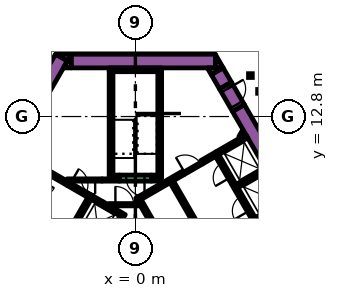
"""IFC4 building model, lengths in metres.
Left out: names, types, materials, properties, quantities, classifications, styles, units other than length and angle.
Written with IfcOpenShell. Run it as: python <this file> out.ifc"""

import sys

from ifc_helpers import new_model, si_unit, direction, frame, frame_2d, origin, origin_2d, place, context, subcontext, project, spatial, polyline, rectangle, outline, extrude, element, fill, save


model = new_model("IFC4")
c1 = context("Model", 3, precision=1e-05, world=origin(), true_north=direction((0.0, 1.0)))
c2 = subcontext(c1, "Body", "Model", "MODEL_VIEW")
j1 = project(units=[si_unit("LENGTHUNIT", "METRE"), si_unit("PLANEANGLEUNIT", "RADIAN")], contexts=[c1])
p1 = place(None, origin())
s1 = spatial("IfcSite", under=j1, at=p1, CompositionType="ELEMENT")
p2 = place(p1, origin())
s2 = spatial("IfcBuilding", under=s1, at=p2, CompositionType="ELEMENT")
p3 = place(p2, origin())
s3 = spatial("IfcBuildingStorey", under=s2, at=p3, CompositionType="ELEMENT", Elevation=0.0)
p4 = place(p3, frame((6.776, 13.364, -1.8), z_axis=(0.0, 0.0, 1.0), x_axis=(0.500004177138, -0.8660229921, 0.0)))
e1 = element("IfcWall", 1, at=p4, inside=s3, PredefinedType="SOLIDWALL", context=c2, shape_type="SweptSolid", body=[
    extrude(rectangle(XDim=20.204, YDim=0.9, at=frame_2d((10.102, 0.0))), origin(), (0.0, 0.0, 1.0), 7.8),
])
p5 = place(p3, frame((-15.36, -1.503, -1.8), z_axis=(0.0, 0.0, 1.0), x_axis=(0.50000389221, 0.866023156604, 0.0)))
e2 = element("IfcWall", 2, at=p5, inside=s3, PredefinedType="SOLIDWALL", context=c2, shape_type="SweptSolid", body=[
    extrude(rectangle(XDim=21.0, YDim=0.9, at=frame_2d((10.5, 0.0))), origin(), (0.0, 0.0, 1.0), 7.8),
])
p6 = place(p3, frame((0.0, 0.0, -1.8)))
e3 = element("IfcWall", 3, at=p6, inside=s3, PredefinedType="SOLIDWALL", context=c2, shape_type="SweptSolid", body=[
    extrude(outline(polyline([(-4.215, 16.9), (-4.469, 16.46), (-5.231, 16.9), (-4.215, 16.9)])), origin(), (0.0, 0.0, 1.0), 7.8),
])
p7 = place(p3, frame((-4.224, 16.45, -1.8), z_axis=(0.0, 0.0, 1.0), x_axis=(1.0, 0.0, 0.0)))
e4 = element("IfcWall", 4, at=p7, inside=s3, PredefinedType="SOLIDWALL", context=c2, shape_type="SweptSolid", body=[
    extrude(rectangle(XDim=9.488, YDim=0.9, at=frame_2d((4.744, 0.0))), origin(), (0.0, 0.0, 1.0), 7.8),
])
e5 = element("IfcWall", 5, at=p6, inside=s3, PredefinedType="SOLIDWALL", context=c2, shape_type="SweptSolid", body=[
    extrude(outline(polyline([(5.265, 16.0), (5.265, 16.88), (5.773, 16.0), (5.265, 16.0)])), origin(), (0.0, 0.0, 1.0), 7.8),
])
e6 = element("IfcWall", 6, at=p6, inside=s3, PredefinedType="SOLIDWALL", context=c2, shape_type="SweptSolid", body=[
    extrude(outline(polyline([(-4.734, 16.0), (-4.226, 16.88), (-4.226, 16.0), (-4.734, 16.0)])), origin(), (0.0, 0.0, 1.0), 7.8),
])
p8 = place(p3, frame((5.926, 14.836, -1.8), z_axis=(0.0, 0.0, 1.0), x_axis=(-0.500076735116, 0.865981096212, 0.0)))
e7 = element("IfcWall", 7, at=p8, inside=s3, PredefinedType="SOLIDWALL", context=c2, shape_type="SweptSolid", body=[
    extrude(rectangle(XDim=1.094, YDim=0.9, at=frame_2d((0.547, 0.0))), origin(), (0.0, 0.0, 1.0), 7.8),
])
e8 = element("IfcWall", 8, at=p6, inside=s3, PredefinedType="SOLIDWALL", context=c2, shape_type="SweptSolid", body=[
    extrude(outline(polyline([(4.734, 16.0), (5.75, 16.0), (4.988, 15.56), (4.734, 16.0)])), origin(), (0.0, 0.0, 1.0), 7.8),
])
p9 = place(p3, frame((-1.725, 15.875, 0.0), z_axis=(0.0, 0.0, 1.0), x_axis=(1.0, 0.0, 0.0)))
e9 = element("IfcWall", 9, at=p9, inside=s3, PredefinedType="SOLIDWALL", context=c2, shape_type="SweptSolid", body=[
    extrude(rectangle(XDim=3.45, YDim=0.25, at=frame_2d((1.725, 0.0))), origin(), (0.0, 0.0, 1.0), 6.0),
])
p10 = place(p3, frame((1.6, 8.95, 0.0), z_axis=(0.0, 0.0, 1.0), x_axis=(0.0, 1.0, 0.0)))
e10 = element("IfcWall", 10, at=p10, inside=s3, PredefinedType="SOLIDWALL", context=c2, shape_type="SweptSolid", body=[
    extrude(rectangle(XDim=6.8, YDim=0.25, at=frame_2d((3.4, 0.0))), origin(), (0.0, 0.0, 1.0), 6.0),
])
p11 = place(p3, frame((1.05, 8.825, 0.0), z_axis=(0.0, 0.0, 1.0), x_axis=(1.0, 0.0, 0.0)))
e11 = element("IfcWall", 11, at=p11, inside=s3, PredefinedType="SOLIDWALL", context=c2, shape_type="SweptSolid", body=[
    extrude(rectangle(XDim=0.675, YDim=0.25, at=frame_2d((0.337, 0.0))), origin(), (0.0, 0.0, 1.0), 6.0),
])
p12 = place(p3, frame((-1.6, 8.7, 0.0), z_axis=(0.0, 0.0, 1.0), x_axis=(0.0, 1.0, 0.0)))
e12 = element("IfcWall", 12, at=p12, inside=s3, PredefinedType="SOLIDWALL", context=c2, shape_type="SweptSolid", body=[
    extrude(rectangle(XDim=7.05, YDim=0.25, at=frame_2d((3.525, 0.0))), origin(), (0.0, 0.0, 1.0), 6.0),
])
p13 = place(p3, frame((-1.475, 8.825, 0.0), z_axis=(0.0, 0.0, 1.0), x_axis=(1.0, 0.0, 0.0)))
e13 = element("IfcWall", 13, at=p13, inside=s3, PredefinedType="SOLIDWALL", context=c2, shape_type="SweptSolid", body=[
    extrude(rectangle(XDim=0.425, YDim=0.25, at=frame_2d((0.212, 0.0))), origin(), (0.0, 0.0, 1.0), 6.0),
])
e14 = element("IfcWall", 14, at=p6, inside=s3, PredefinedType="SOLIDWALL", context=c2, shape_type="SweptSolid", body=[
    extrude(outline(polyline([(0.335, 6.925), (0.335, 7.075), (0.335, 7.075), (0.335, 7.075), (0.245, 7.075), (0.079, 7.363), (0.035, 7.439), (0.252, 7.564), (0.377, 7.348), (6.552, -3.348), (6.677, -3.564), (6.46, -3.689), (4.897, -0.981), (0.332, 6.925), (0.335, 6.925), (0.335, 6.925), (0.335, 6.925)])), origin(), (0.0, 0.0, 1.0), 7.8),
])
p14 = place(p3, frame((4.358, 9.791, -1.8), z_axis=(0.0, 0.0, 1.0), x_axis=(0.866079547155, 0.499906209203, 0.0)))
e15 = element("IfcWall", 15, at=p14, inside=s3, PredefinedType="SOLIDWALL", context=c2, shape_type="SweptSolid", body=[
    extrude(rectangle(XDim=1.15, YDim=0.25, at=frame_2d((0.575, 0.0))), origin(), (0.0, 0.0, 1.0), 7.8),
])
p15 = place(p3, frame((5.356, 10.367, -1.8), z_axis=(0.0, 0.0, 1.0), x_axis=(0.865978535641, 0.50008116922, 0.0)))
e16 = element("IfcWall", 16, at=p15, inside=s3, PredefinedType="SOLIDWALL", context=c2, shape_type="SweptSolid", body=[
    extrude(rectangle(XDim=2.278, YDim=0.25, at=frame_2d((1.139, 0.0))), origin(), (0.0, 0.0, 1.0), 7.8),
])
p16 = place(p3, frame((0.314, 7.456, -1.8), z_axis=(0.0, 0.0, 1.0), x_axis=(0.866013897511, 0.50001992892, 0.0)))
e17 = element("IfcWall", 17, at=p16, inside=s3, PredefinedType="SOLIDWALL", context=c2, shape_type="SweptSolid", body=[
    extrude(rectangle(XDim=3.268, YDim=0.25, at=frame_2d((1.634, 0.0))), origin(), (0.0, 0.0, 1.0), 7.8),
])
for number, where, z_axis, x_axis in (
    (18, (6.684, 8.224, -1.8), (0.0, 0.0, 1.0), (0.866, 0.5, 0.0)),
    (19, (7.944, 6.041, -1.8), (0.0, 0.0, 1.0), (0.866, 0.5, 0.0)),
):
    element("IfcWall", number, at=place(p3, frame(where, z_axis=z_axis, x_axis=x_axis)), inside=s3, PredefinedType="SOLIDWALL", context=c2, shape_type="SweptSolid", body=[
        extrude(rectangle(XDim=2.2, YDim=0.25, at=frame_2d((1.1, 0.0))), origin(), (0.0, 0.0, 1.0), 7.8),
    ])
p17 = place(p3, frame((-8.06, -1.311, -1.8), z_axis=(0.0, 0.0, 1.0), x_axis=(0.50000273126, 0.866023826885, 0.0)))
e20 = element("IfcWall", 20, at=p17, inside=s3, PredefinedType="SOLIDWALL", context=c2, shape_type="SweptSolid", body=[
    extrude(rectangle(XDim=10.33, YDim=0.25, at=frame_2d((5.165, 0.0))), origin(), (0.0, 0.0, 1.0), 7.8),
])
p18 = place(p3, frame((-1.819, 6.87, -1.8), z_axis=(0.0, 0.0, 1.0), x_axis=(-0.866294599386, 0.499533449405, 0.0)))
e21 = element("IfcWall", 21, at=p18, inside=s3, PredefinedType="SOLIDWALL", context=c2, shape_type="SweptSolid", body=[
    extrude(rectangle(XDim=0.41, YDim=0.25, at=frame_2d((0.205, 0.0))), origin(), (0.0, 0.0, 1.0), 7.8),
])
p19 = place(p3, frame((-2.849, 7.465, -1.8), z_axis=(0.0, 0.0, 1.0), x_axis=(0.865955664968, -0.500120771724, 0.0)))
e22 = element("IfcWall", 22, at=p19, inside=s3, PredefinedType="SOLIDWALL", context=c2, shape_type="SweptSolid", body=[
    extrude(rectangle(XDim=0.778, YDim=0.25, at=frame_2d((0.389, 0.0))), origin(), (0.0, 0.0, 1.0), 7.8),
])
p20 = place(p3, frame((-0.728, 6.24, -1.8), z_axis=(0.0, 0.0, 1.0), x_axis=(-0.866002680491, 0.500039355833, 0.0)))
e23 = element("IfcWall", 23, at=p20, inside=s3, PredefinedType="SOLIDWALL", context=c2, shape_type="SweptSolid", body=[
    extrude(rectangle(XDim=1.178, YDim=0.25, at=frame_2d((0.589, 0.0))), origin(), (0.0, 0.0, 1.0), 7.8),
])
e24 = element("IfcWall", 24, at=p6, inside=s3, PredefinedType="SOLIDWALL", context=c2, shape_type="SweptSolid", body=[
    extrude(outline(polyline([(-3.128, 7.481), (-3.259, 7.557), (-3.134, 7.773), (-3.003, 7.698), (-3.128, 7.481)])), origin(), (0.0, 0.0, 1.0), 7.8),
])
p21 = place(p3, frame((-7.959, 10.415, -1.8), z_axis=(0.0, 0.0, 1.0), x_axis=(0.866020958405, -0.500007699544, 0.0)))
e25 = element("IfcWall", 25, at=p21, inside=s3, PredefinedType="SOLIDWALL", context=c2, shape_type="SweptSolid", body=[
    extrude(rectangle(XDim=4.1, YDim=0.25, at=frame_2d((2.05, 0.0))), origin(), (0.0, 0.0, 1.0), 7.8),
])
p22 = place(p3, frame((-3.997, 8.625, 0.0), z_axis=(0.0, 0.0, 1.0), x_axis=(-1.0, 0.0, 0.0)))
e26 = element("IfcWall", 26, at=p22, inside=s3, PredefinedType="PARTITIONING", context=c2, shape_type="SweptSolid", body=[
    extrude(rectangle(XDim=0.502, YDim=0.15, at=frame_2d((0.251, 0.0))), origin(), (0.0, 0.0, 1.0), 5.1),
])
p23 = place(p3, frame((-2.196, 8.625, 0.0), z_axis=(0.0, 0.0, 1.0), x_axis=(1.0, 0.0, 0.0)))
e27 = element("IfcWall", 27, at=p23, inside=s3, PredefinedType="PARTITIONING", context=c2, shape_type="SweptSolid", body=[
    extrude(rectangle(XDim=1.146, YDim=0.15, at=frame_2d((0.573, 0.0))), origin(), (0.0, 0.0, 1.0), 5.1),
])
p24 = place(p3, frame((1.05, 8.625, 0.0), z_axis=(0.0, 0.0, 1.0), x_axis=(1.0, 0.0, 0.0)))
e28 = element("IfcWall", 28, at=p24, inside=s3, PredefinedType="PARTITIONING", context=c2, shape_type="SweptSolid", body=[
    extrude(rectangle(XDim=0.514, YDim=0.15, at=frame_2d((0.257, 0.0))), origin(), (0.0, 0.0, 1.0), 5.1),
])
p25 = place(p3, frame((6.872, 11.45, 0.0), z_axis=(0.0, 0.0, 1.0), x_axis=(0.499846793097, 0.866113839764, 0.0)))
e29 = element("IfcWall", 29, at=p25, inside=s3, PredefinedType="PARTITIONING", context=c2, shape_type="SweptSolid", body=[
    extrude(rectangle(XDim=0.453, YDim=0.15, at=frame_2d((0.227, 0.0))), origin(), (0.0, 0.0, 1.0), 5.1),
])
p26 = place(p3, frame((7.131, 11.6, 0.0), z_axis=(0.0, 0.0, 1.0), x_axis=(0.498600033135, 0.866832167699, 0.0)))
e30 = element("IfcWall", 30, at=p26, inside=s3, PredefinedType="PARTITIONING", context=c2, shape_type="SweptSolid", body=[
    extrude(rectangle(XDim=0.107, YDim=0.15, at=frame_2d((0.053, 0.0))), origin(), (0.0, 0.0, 1.0), 5.1),
])
p27 = place(p3, frame((11.553, -0.46, -1.8), z_axis=(0.0, 0.0, 1.0), x_axis=(-0.500006514828, 0.866021642414, 0.0)))
e31 = element("IfcWall", 31, at=p27, inside=s3, PredefinedType="SOLIDWALL", context=c2, shape_type="SweptSolid", body=[
    extrude(rectangle(XDim=12.35, YDim=0.25, at=frame_2d((6.175, 0.0))), origin(), (0.0, 0.0, 1.0), 7.8),
])
p28 = place(p27, frame((0.585, 0.0, 1.8)))
e32 = element("IfcOpeningElement", 32, at=p28, cuts=e31, PredefinedType="OPENING", context=c2, shape_type="SweptSolid", body=[
    extrude(rectangle(XDim=1.1, YDim=2.1, at=frame_2d((0.55, 1.05))), frame((0.0, 0.135, 0.0), z_axis=(0.0, -1.0, 0.0), x_axis=(1.0, 0.0, 0.0)), (0.0, 0.0, 1.0), 0.27),
])
p29 = place(p27, frame((3.105, 0.0, 1.8)))
e33 = element("IfcOpeningElement", 33, at=p29, cuts=e31, PredefinedType="OPENING", context=c2, shape_type="SweptSolid", body=[
    extrude(rectangle(XDim=1.1, YDim=2.1, at=frame_2d((0.55, 1.05))), frame((0.0, 0.135, 0.0), z_axis=(0.0, -1.0, 0.0), x_axis=(1.0, 0.0, 0.0)), (0.0, 0.0, 1.0), 0.27),
])
p30 = place(p27, frame((5.625, 0.0, 1.8)))
e34 = element("IfcOpeningElement", 34, at=p30, cuts=e31, PredefinedType="OPENING", context=c2, shape_type="SweptSolid", body=[
    extrude(rectangle(XDim=1.1, YDim=2.1, at=frame_2d((0.55, 1.05))), frame((0.0, 0.135, 0.0), z_axis=(0.0, -1.0, 0.0), x_axis=(1.0, 0.0, 0.0)), (0.0, 0.0, 1.0), 0.27),
])
p31 = place(p27, frame((8.145, 0.0, 1.8)))
e35 = element("IfcOpeningElement", 35, at=p31, cuts=e31, PredefinedType="OPENING", context=c2, shape_type="SweptSolid", body=[
    extrude(rectangle(XDim=1.1, YDim=2.1, at=frame_2d((0.55, 1.05))), frame((0.0, 0.135, 0.0), z_axis=(0.0, -1.0, 0.0), x_axis=(1.0, 0.0, 0.0)), (0.0, 0.0, 1.0), 0.27),
])
p32 = place(p27, frame((10.665, 0.0, 1.8)))
e36 = element("IfcOpeningElement", 36, at=p32, cuts=e31, PredefinedType="OPENING", context=c2, shape_type="SweptSolid", body=[
    extrude(rectangle(XDim=1.1, YDim=2.1, at=frame_2d((0.55, 1.05))), frame((0.0, 0.135, 0.0), z_axis=(0.0, -1.0, 0.0), x_axis=(1.0, 0.0, 0.0)), (0.0, 0.0, 1.0), 0.27),
])
p33 = place(p3, frame((8.565, -2.185, -1.8), z_axis=(0.0, 0.0, 1.0), x_axis=(-0.499997954832, 0.866026584559, 0.0)))
e37 = element("IfcWall", 37, at=p33, inside=s3, PredefinedType="SOLIDWALL", context=c2, shape_type="SweptSolid", body=[
    extrude(rectangle(XDim=12.35, YDim=0.25, at=frame_2d((6.175, 0.0))), origin(), (0.0, 0.0, 1.0), 7.8),
])
p34 = place(p33, frame((5.725, 0.0, 1.8)))
e38 = element("IfcOpeningElement", 38, at=p34, cuts=e37, PredefinedType="OPENING", context=c2, shape_type="SweptSolid", body=[
    extrude(rectangle(XDim=0.9, YDim=2.1, at=frame_2d((0.45, 1.05))), frame((0.0, 0.135, 0.0), z_axis=(0.0, -1.0, 0.0), x_axis=(1.0, 0.0, 0.0)), (0.0, 0.0, 1.0), 0.27),
])
p35 = place(p3, frame((-0.898, 6.194, -1.8), z_axis=(0.0, 0.0, 1.0), x_axis=(-0.499996202215, -0.866027596426, 0.0)))
e39 = element("IfcWall", 39, at=p35, inside=s3, PredefinedType="SOLIDWALL", context=c2, shape_type="SweptSolid", body=[
    extrude(rectangle(XDim=9.83, YDim=0.25, at=frame_2d((4.915, 0.0))), origin(), (0.0, 0.0, 1.0), 7.8),
])
p36 = place(p35, frame((0.585, 0.0, 1.8)))
e40 = element("IfcOpeningElement", 40, at=p36, cuts=e39, PredefinedType="OPENING", context=c2, shape_type="SweptSolid", body=[
    extrude(rectangle(XDim=1.1, YDim=2.1, at=frame_2d((0.55, 1.05))), frame((0.0, 0.135, 0.0), z_axis=(0.0, -1.0, 0.0), x_axis=(1.0, 0.0, 0.0)), (0.0, 0.0, 1.0), 0.27),
])
p37 = place(p35, frame((3.105, 0.0, 1.8)))
e41 = element("IfcOpeningElement", 41, at=p37, cuts=e39, PredefinedType="OPENING", context=c2, shape_type="SweptSolid", body=[
    extrude(rectangle(XDim=1.1, YDim=2.1, at=frame_2d((0.55, 1.05))), frame((0.0, 0.135, 0.0), z_axis=(0.0, -1.0, 0.0), x_axis=(1.0, 0.0, 0.0)), (0.0, 0.0, 1.0), 0.27),
])
p38 = place(p35, frame((5.625, 0.0, 1.8)))
e42 = element("IfcOpeningElement", 42, at=p38, cuts=e39, PredefinedType="OPENING", context=c2, shape_type="SweptSolid", body=[
    extrude(rectangle(XDim=1.1, YDim=2.1, at=frame_2d((0.55, 1.05))), frame((0.0, 0.135, 0.0), z_axis=(0.0, -1.0, 0.0), x_axis=(1.0, 0.0, 0.0)), (0.0, 0.0, 1.0), 0.27),
])
p39 = place(p35, frame((8.145, 0.0, 1.8)))
e43 = element("IfcOpeningElement", 43, at=p39, cuts=e39, PredefinedType="OPENING", context=c2, shape_type="SweptSolid", body=[
    extrude(rectangle(XDim=1.1, YDim=2.1, at=frame_2d((0.55, 1.05))), frame((0.0, 0.135, 0.0), z_axis=(0.0, -1.0, 0.0), x_axis=(1.0, 0.0, 0.0)), (0.0, 0.0, 1.0), 0.27),
])
p40 = place(p3, frame((1.05, 8.75, 0.0), z_axis=(0.0, 0.0, 1.0), x_axis=(-1.0, 0.0, 0.0)))
e44 = element("IfcWall", 44, at=p40, inside=s3, PredefinedType="SOLIDWALL", context=c2, shape_type="SweptSolid", body=[
    extrude(rectangle(XDim=2.1, YDim=0.4, at=frame_2d((1.05, 0.0))), origin(), (0.0, 0.0, 1.0), 6.0),
])
p41 = place(p40, frame((0.45, 0.0, 0.0)))
e45 = element("IfcOpeningElement", 45, at=p41, cuts=e44, PredefinedType="OPENING", context=c2, shape_type="SweptSolid", body=[
    extrude(rectangle(XDim=1.2, YDim=2.1, at=frame_2d((0.6, 1.05))), frame((0.0, 0.21, 0.0), z_axis=(0.0, -1.0, 0.0), x_axis=(1.0, 0.0, 0.0)), (0.0, 0.0, 1.0), 0.42),
])
p42 = place(p3, frame((-2.196, 8.625, 0.0), z_axis=(0.0, 0.0, 1.0), x_axis=(-1.0, 0.0, 0.0)))
e46 = element("IfcWall", 46, at=p42, inside=s3, PredefinedType="PARTITIONING", context=c2, shape_type="SweptSolid", body=[
    extrude(rectangle(XDim=1.8, YDim=0.15, at=frame_2d((0.9, 0.0))), origin(), (0.0, 0.0, 1.0), 5.1),
])
p43 = place(p42, frame((0.45, 0.0, 0.0)))
e47 = element("IfcOpeningElement", 47, at=p43, cuts=e46, PredefinedType="OPENING", context=c2, shape_type="SweptSolid", body=[
    extrude(rectangle(XDim=0.9, YDim=2.1, at=frame_2d((0.45, 1.05))), frame((0.0, 0.085, 0.0), z_axis=(0.0, -1.0, 0.0), x_axis=(1.0, 0.0, 0.0)), (0.0, 0.0, 1.0), 0.17),
])
p44 = place(p3, frame((-1.765, 7.0, 0.0), z_axis=(0.0, 0.0, 1.0), x_axis=(1.0, 0.0, 0.0)))
e48 = element("IfcWall", 48, at=p44, inside=s3, PredefinedType="PARTITIONING", context=c2, shape_type="SweptSolid", body=[
    extrude(rectangle(XDim=2.1, YDim=0.15, at=frame_2d((1.05, 0.0))), origin(), (0.0, 0.0, 1.0), 5.1),
])
p45 = place(p44, frame((0.45, 0.0, 0.0)))
e49 = element("IfcOpeningElement", 49, at=p45, cuts=e48, PredefinedType="OPENING", context=c2, shape_type="SweptSolid", body=[
    extrude(rectangle(XDim=1.2, YDim=2.1, at=frame_2d((0.6, 1.05))), frame((0.0, 0.085, 0.0), z_axis=(0.0, -1.0, 0.0), x_axis=(1.0, 0.0, 0.0)), (0.0, 0.0, 1.0), 0.17),
])
p46 = place(p3, frame((3.183, 9.02, 0.0), z_axis=(0.0, 0.0, 1.0), x_axis=(0.866034573852, 0.49998411664, 0.0)))
e50 = element("IfcWall", 50, at=p46, inside=s3, PredefinedType="PARTITIONING", context=c2, shape_type="SweptSolid", body=[
    extrude(rectangle(XDim=1.4, YDim=0.09, at=frame_2d((0.7, 0.0))), origin(), (0.0, 0.0, 1.0), 5.1),
])
p47 = place(p46, frame((0.1, 0.0, 0.0)))
e51 = element("IfcOpeningElement", 51, at=p47, cuts=e50, PredefinedType="OPENING", context=c2, shape_type="SweptSolid", body=[
    extrude(rectangle(XDim=1.2, YDim=2.1, at=frame_2d((0.6, 1.05))), frame((0.0, 0.055, 0.0), z_axis=(0.0, -1.0, 0.0), x_axis=(1.0, 0.0, 0.0)), (0.0, 0.0, 1.0), 0.11),
])
p48 = place(p3, frame((-4.409, 8.365, -1.8), z_axis=(0.0, 0.0, 1.0), x_axis=(0.866034573852, -0.49998411664, 0.0)))
e52 = element("IfcWall", 52, at=p48, inside=s3, PredefinedType="SOLIDWALL", context=c2, shape_type="SweptSolid", body=[
    extrude(rectangle(XDim=1.4, YDim=0.25, at=frame_2d((0.7, 0.0))), origin(), (0.0, 0.0, 1.0), 7.8),
])
p49 = place(p48, frame((0.1, 0.0, 1.8)))
e53 = element("IfcOpeningElement", 53, at=p49, cuts=e52, PredefinedType="OPENING", context=c2, shape_type="SweptSolid", body=[
    extrude(rectangle(XDim=1.2, YDim=2.1, at=frame_2d((0.6, 1.05))), frame((0.0, 0.135, 0.0), z_axis=(0.0, -1.0, 0.0), x_axis=(1.0, 0.0, 0.0)), (0.0, 0.0, 1.0), 0.27),
])
p50 = place(p3, frame((5.926, 14.836, -1.8), z_axis=(0.0, 0.0, 1.0), x_axis=(0.500062241894, -0.865989465428, 0.0)))
e54 = element("IfcWall", 54, at=p50, inside=s3, PredefinedType="SOLIDWALL", context=c2, shape_type="SweptSolid", body=[
    extrude(rectangle(XDim=1.7, YDim=0.9, at=frame_2d((0.85, 0.0))), origin(), (0.0, 0.0, 1.0), 7.8),
])
p51 = place(p50, frame((0.25, 0.0, 1.8)))
e55 = element("IfcOpeningElement", 55, at=p51, cuts=e54, PredefinedType="OPENING", context=c2, shape_type="SweptSolid", body=[
    extrude(rectangle(XDim=1.2, YDim=2.1, at=frame_2d((0.6, 1.05))), frame((0.0, 0.46, 0.0), z_axis=(0.0, -1.0, 0.0), x_axis=(1.0, 0.0, 0.0)), (0.0, 0.0, 1.0), 0.92),
])
for number, where, z_axis, x_axis in (
    (56, (8.167, 14.455, 0.0), (0.0, 0.0, 1.0), (1.0, 0.0, 0.0)),
    (57, (7.566, 15.495, 0.0), (0.0, 0.0, 1.0), (1.0, 0.0, 0.0)),
):
    element("IfcColumn", number, at=place(p3, frame(where, z_axis=z_axis, x_axis=x_axis)), inside=s3, PredefinedType="COLUMN", context=c2, shape_type="SweptSolid", body=[
        extrude(rectangle(XDim=0.25, YDim=0.25, at=origin_2d()), origin(), (0.0, 0.0, 1.0), 5.8),
    ])
p52 = place(p31, origin())
e58 = element("IfcDoor", 58, at=p52, inside=s3, OperationType="DOUBLE_DOOR_SLIDING", PredefinedType="DOOR", context=c2, shape_type="SweptSolid", body=[
    extrude(rectangle(XDim=1.1, YDim=2.1, at=frame_2d((0.55, 1.05))), frame((0.0, 0.025, 0.0), z_axis=(0.0, -1.0, 0.0), x_axis=(1.0, 0.0, 0.0)), (0.0, 0.0, 1.0), 0.05),
])
fill(e35, e58)
p53 = place(p32, origin())
e59 = element("IfcDoor", 59, at=p53, inside=s3, OperationType="DOUBLE_DOOR_SLIDING", PredefinedType="DOOR", context=c2, shape_type="SweptSolid", body=[
    extrude(rectangle(XDim=1.1, YDim=2.1, at=frame_2d((0.55, 1.05))), frame((0.0, 0.025, 0.0), z_axis=(0.0, -1.0, 0.0), x_axis=(1.0, 0.0, 0.0)), (0.0, 0.0, 1.0), 0.05),
])
fill(e36, e59)
p54 = place(p41, origin())
e60 = element("IfcDoor", 60, at=p54, inside=s3, OperationType="SINGLE_SWING_LEFT", PredefinedType="DOOR", context=c2, shape_type="SweptSolid", body=[
    extrude(rectangle(XDim=1.2, YDim=2.1, at=frame_2d((0.6, 1.05))), frame((0.0, 0.025, 0.0), z_axis=(0.0, -1.0, 0.0), x_axis=(1.0, 0.0, 0.0)), (0.0, 0.0, 1.0), 0.05),
])
fill(e45, e60)
p55 = place(p43, origin())
e61 = element("IfcDoor", 61, at=p55, inside=s3, OperationType="SINGLE_SWING_LEFT", PredefinedType="DOOR", context=c2, shape_type="SweptSolid", body=[
    extrude(rectangle(XDim=0.9, YDim=2.1, at=frame_2d((0.45, 1.05))), frame((0.0, 0.025, 0.0), z_axis=(0.0, -1.0, 0.0), x_axis=(1.0, 0.0, 0.0)), (0.0, 0.0, 1.0), 0.05),
])
fill(e47, e61)
p56 = place(p45, origin())
e62 = element("IfcDoor", 62, at=p56, inside=s3, OperationType="SINGLE_SWING_LEFT", PredefinedType="DOOR", context=c2, shape_type="SweptSolid", body=[
    extrude(rectangle(XDim=1.2, YDim=2.1, at=frame_2d((0.6, 1.05))), frame((0.0, 0.025, 0.0), z_axis=(0.0, -1.0, 0.0), x_axis=(1.0, 0.0, 0.0)), (0.0, 0.0, 1.0), 0.05),
])
fill(e49, e62)
p57 = place(p47, origin())
e63 = element("IfcDoor", 63, at=p57, inside=s3, OperationType="SINGLE_SWING_LEFT", PredefinedType="DOOR", context=c2, shape_type="SweptSolid", body=[
    extrude(rectangle(XDim=1.2, YDim=2.1, at=frame_2d((0.6, 1.05))), frame((0.0, 0.025, 0.0), z_axis=(0.0, -1.0, 0.0), x_axis=(1.0, 0.0, 0.0)), (0.0, 0.0, 1.0), 0.05),
])
fill(e51, e63)
p58 = place(p49, origin())
e64 = element("IfcDoor", 64, at=p58, inside=s3, OperationType="SINGLE_SWING_LEFT", PredefinedType="DOOR", context=c2, shape_type="SweptSolid", body=[
    extrude(rectangle(XDim=1.2, YDim=2.1, at=frame_2d((0.6, 1.05))), frame((0.0, 0.025, 0.0), z_axis=(0.0, -1.0, 0.0), x_axis=(1.0, 0.0, 0.0)), (0.0, 0.0, 1.0), 0.05),
])
fill(e53, e64)
p59 = place(p51, origin())
e65 = element("IfcDoor", 65, at=p59, inside=s3, OperationType="SINGLE_SWING_LEFT", PredefinedType="DOOR", context=c2, shape_type="SweptSolid", body=[
    extrude(rectangle(XDim=1.2, YDim=2.1, at=frame_2d((0.6, 1.05))), frame((0.0, 0.025, 0.0), z_axis=(0.0, -1.0, 0.0), x_axis=(1.0, 0.0, 0.0)), (0.0, 0.0, 1.0), 0.05),
])
fill(e55, e65)
save(model, sys.argv[1])
